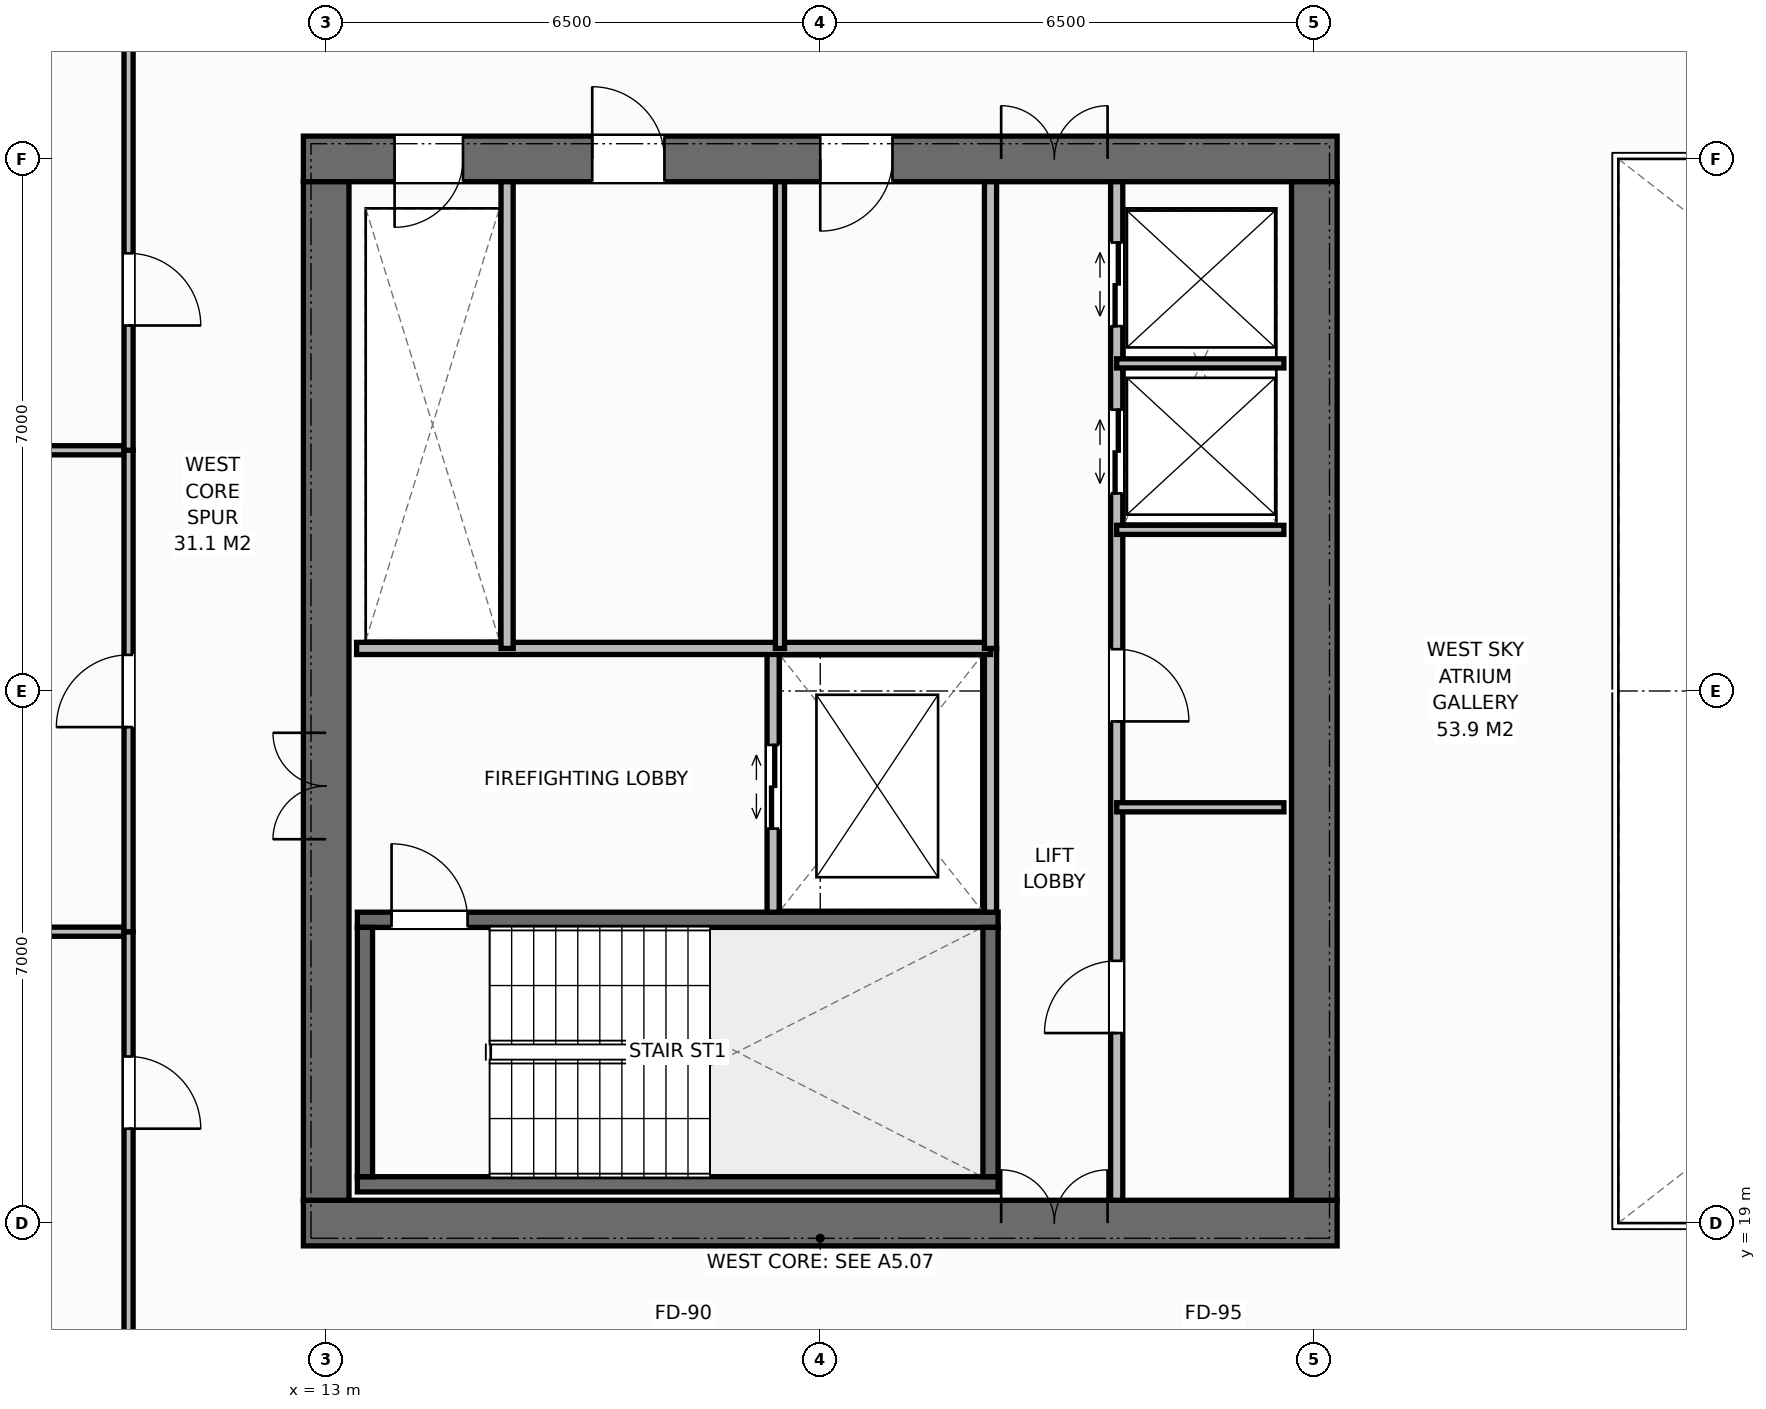
"""IFC4 building model, lengths in metres.
Left out: names, types, materials, properties, quantities, classifications, styles, units other than length and angle.
Written with IfcOpenShell. Run it as: python <this file> out.ifc"""

import sys

from ifc_helpers import new_model, si_unit, direction, frame, frame_2d, origin, place, context, subcontext, project, spatial, rectangle, extrude, element, fill, save


model = new_model("IFC4")
c1 = context("Model", 3, precision=1e-05, world=origin(), true_north=direction((0.0, 1.0)))
c2 = subcontext(c1, "Body", "Model", "MODEL_VIEW")
j1 = project(units=[si_unit("LENGTHUNIT", "METRE"), si_unit("PLANEANGLEUNIT", "RADIAN")], contexts=[c1])
p1 = place(None, origin())
s1 = spatial("IfcSite", under=j1, at=p1, CompositionType="ELEMENT")
p2 = place(p1, origin())
s2 = spatial("IfcBuilding", under=s1, at=p2, CompositionType="ELEMENT")
p3 = place(p2, frame((0.0, 0.0, 159.4)))
s3 = spatial("IfcBuildingStorey", under=s2, at=p3, CompositionType="ELEMENT", Elevation=159.4)
p4 = place(p3, frame((12.7, 19.0, 0.0), z_axis=(0.0, 0.0, 1.0), x_axis=(1.0, 0.0, 0.0)))
e1 = element("IfcWall", 1, at=p4, inside=s3, PredefinedType="SHEAR", context=c2, shape_type="SweptSolid", body=[
    extrude(rectangle(XDim=13.6, YDim=0.6, at=frame_2d((6.8, 0.0))), origin(), (0.0, 0.0, 1.0), 3.8),
])
p5 = place(p4, frame((9.18, 0.0, 0.0)))
e2 = element("IfcOpeningElement", 2, at=p5, cuts=e1, PredefinedType="OPENING", context=c2, shape_type="SweptSolid", body=[
    extrude(rectangle(XDim=1.4, YDim=2.2, at=frame_2d((0.7, 1.1))), frame((0.0, 0.31, 0.0), z_axis=(0.0, -1.0, 0.0), x_axis=(1.0, 0.0, 0.0)), (0.0, 0.0, 1.0), 0.62),
])
p6 = place(p3, frame((12.7, 33.0, 0.0), z_axis=(0.0, 0.0, 1.0), x_axis=(1.0, 0.0, 0.0)))
e3 = element("IfcWall", 3, at=p6, inside=s3, PredefinedType="SHEAR", context=c2, shape_type="SweptSolid", body=[
    extrude(rectangle(XDim=13.6, YDim=0.6, at=frame_2d((6.8, 0.0))), origin(), (0.0, 0.0, 1.0), 3.8),
])
p7 = place(p6, frame((1.2, 0.0, 0.0)))
e4 = element("IfcOpeningElement", 4, at=p7, cuts=e3, PredefinedType="OPENING", context=c2, shape_type="SweptSolid", body=[
    extrude(rectangle(XDim=0.9, YDim=2.15, at=frame_2d((0.45, 1.075))), frame((0.0, 0.31, 0.0), z_axis=(0.0, -1.0, 0.0), x_axis=(1.0, 0.0, 0.0)), (0.0, 0.0, 1.0), 0.62),
])
p8 = place(p6, frame((3.8, 0.0, 0.0)))
e5 = element("IfcOpeningElement", 5, at=p8, cuts=e3, PredefinedType="OPENING", context=c2, shape_type="SweptSolid", body=[
    extrude(rectangle(XDim=0.95, YDim=2.15, at=frame_2d((0.475, 1.075))), frame((0.0, 0.31, 0.0), z_axis=(0.0, -1.0, 0.0), x_axis=(1.0, 0.0, 0.0)), (0.0, 0.0, 1.0), 0.62),
])
p9 = place(p6, frame((6.8, 0.0, 0.0)))
e6 = element("IfcOpeningElement", 6, at=p9, cuts=e3, PredefinedType="OPENING", context=c2, shape_type="SweptSolid", body=[
    extrude(rectangle(XDim=0.95, YDim=2.15, at=frame_2d((0.475, 1.075))), frame((0.0, 0.31, 0.0), z_axis=(0.0, -1.0, 0.0), x_axis=(1.0, 0.0, 0.0)), (0.0, 0.0, 1.0), 0.62),
])
p10 = place(p6, frame((9.18, 0.0, 0.0)))
e7 = element("IfcOpeningElement", 7, at=p10, cuts=e3, PredefinedType="OPENING", context=c2, shape_type="SweptSolid", body=[
    extrude(rectangle(XDim=1.4, YDim=2.2, at=frame_2d((0.7, 1.1))), frame((0.0, 0.31, 0.0), z_axis=(0.0, -1.0, 0.0), x_axis=(1.0, 0.0, 0.0)), (0.0, 0.0, 1.0), 0.62),
])
p11 = place(p3, frame((13.0, 19.3, 0.0), z_axis=(0.0, 0.0, 1.0), x_axis=(0.0, 1.0, 0.0)))
e8 = element("IfcWall", 8, at=p11, inside=s3, PredefinedType="SHEAR", context=c2, shape_type="SweptSolid", body=[
    extrude(rectangle(XDim=13.4, YDim=0.6, at=frame_2d((6.7, 0.0))), origin(), (0.0, 0.0, 1.0), 3.8),
])
p12 = place(p11, frame((4.75, 0.0, 0.0)))
e9 = element("IfcOpeningElement", 9, at=p12, cuts=e8, PredefinedType="OPENING", context=c2, shape_type="SweptSolid", body=[
    extrude(rectangle(XDim=1.4, YDim=2.2, at=frame_2d((0.7, 1.1))), frame((0.0, 0.31, 0.0), z_axis=(0.0, -1.0, 0.0), x_axis=(1.0, 0.0, 0.0)), (0.0, 0.0, 1.0), 0.62),
])
p13 = place(p3, frame((26.0, 19.3, 0.0), z_axis=(0.0, 0.0, 1.0), x_axis=(0.0, 1.0, 0.0)))
e10 = element("IfcWall", 10, at=p13, inside=s3, PredefinedType="SHEAR", context=c2, shape_type="SweptSolid", body=[
    extrude(rectangle(XDim=13.4, YDim=0.6, at=frame_2d((6.7, 0.0))), origin(), (0.0, 0.0, 1.0), 3.8),
])
p14 = place(p3, frame((13.41, 19.51, 0.0), z_axis=(0.0, 0.0, 1.0), x_axis=(1.0, 0.0, 0.0)))
e11 = element("IfcWall", 11, at=p14, inside=s3, PredefinedType="SHEAR", context=c2, shape_type="SweptSolid", body=[
    extrude(rectangle(XDim=8.43, YDim=0.2, at=frame_2d((4.215, 0.0))), origin(), (0.0, 0.0, 1.0), 3.8),
])
p15 = place(p3, frame((13.41, 22.99, 0.0), z_axis=(0.0, 0.0, 1.0), x_axis=(1.0, 0.0, 0.0)))
e12 = element("IfcWall", 12, at=p15, inside=s3, PredefinedType="SHEAR", context=c2, shape_type="SweptSolid", body=[
    extrude(rectangle(XDim=8.43, YDim=0.2, at=frame_2d((4.215, 0.0))), origin(), (0.0, 0.0, 1.0), 3.8),
])
p16 = place(p15, frame((0.45, 0.0, 0.0)))
e13 = element("IfcOpeningElement", 13, at=p16, cuts=e12, PredefinedType="OPENING", context=c2, shape_type="SweptSolid", body=[
    extrude(rectangle(XDim=1.0, YDim=2.15, at=frame_2d((0.5, 1.075))), frame((0.0, 0.11, 0.0), z_axis=(0.0, -1.0, 0.0), x_axis=(1.0, 0.0, 0.0)), (0.0, 0.0, 1.0), 0.22),
])
for number, where, z_axis, x_axis in (
    (14, (13.51, 19.61, 0.0), (0.0, 0.0, 1.0), (0.0, 1.0, 0.0)),
    (15, (21.74, 19.61, 0.0), (0.0, 0.0, 1.0), (0.0, 1.0, 0.0)),
):
    element("IfcWall", number, at=place(p3, frame(where, z_axis=z_axis, x_axis=x_axis)), inside=s3, PredefinedType="SHEAR", context=c2, shape_type="SweptSolid", body=[
        extrude(rectangle(XDim=3.28, YDim=0.2, at=frame_2d((1.64, 0.0))), origin(), (0.0, 0.0, 1.0), 3.8),
    ])
p17 = place(p3, frame((21.74, 23.09, 0.0), z_axis=(0.0, 0.0, 1.0), x_axis=(0.0, 1.0, 0.0)))
e16 = element("IfcWall", 16, at=p17, inside=s3, PredefinedType="STANDARD", context=c2, shape_type="SweptSolid", body=[
    extrude(rectangle(XDim=3.47, YDim=0.16, at=frame_2d((1.735, 0.0))), origin(), (0.0, 0.0, 1.0), 3.572),
])
p18 = place(p3, frame((18.88, 23.09, 0.0), z_axis=(0.0, 0.0, 1.0), x_axis=(0.0, 1.0, 0.0)))
e17 = element("IfcWall", 17, at=p18, inside=s3, PredefinedType="STANDARD", context=c2, shape_type="SweptSolid", body=[
    extrude(rectangle(XDim=3.47, YDim=0.16, at=frame_2d((1.735, 0.0))), origin(), (0.0, 0.0, 1.0), 3.572),
])
p19 = place(p18, frame((1.1, 0.0, 0.0)))
e18 = element("IfcOpeningElement", 18, at=p19, cuts=e17, PredefinedType="OPENING", context=c2, shape_type="SweptSolid", body=[
    extrude(rectangle(XDim=1.1, YDim=2.2, at=frame_2d((0.55, 1.1))), frame((0.0, 0.09, 0.0), z_axis=(0.0, -1.0, 0.0), x_axis=(1.0, 0.0, 0.0)), (0.0, 0.0, 1.0), 0.18),
])
p20 = place(p3, frame((13.4, 26.56, 0.0), z_axis=(0.0, 0.0, 1.0), x_axis=(1.0, 0.0, 0.0)))
e19 = element("IfcWall", 19, at=p20, inside=s3, PredefinedType="STANDARD", context=c2, shape_type="SweptSolid", body=[
    extrude(rectangle(XDim=8.34, YDim=0.16, at=frame_2d((4.17, 0.0))), origin(), (0.0, 0.0, 1.0), 3.572),
])
p21 = place(p3, frame((15.38, 26.56, 0.0), z_axis=(0.0, 0.0, 1.0), x_axis=(0.0, 1.0, 0.0)))
e20 = element("IfcWall", 20, at=p21, inside=s3, PredefinedType="STANDARD", context=c2, shape_type="SweptSolid", body=[
    extrude(rectangle(XDim=6.14, YDim=0.16, at=frame_2d((3.07, 0.0))), origin(), (0.0, 0.0, 1.0), 3.572),
])
p22 = place(p3, frame((18.97, 26.56, 0.0), z_axis=(0.0, 0.0, 1.0), x_axis=(0.0, 1.0, 0.0)))
e21 = element("IfcWall", 21, at=p22, inside=s3, PredefinedType="PARTITIONING", context=c2, shape_type="SweptSolid", body=[
    extrude(rectangle(XDim=6.14, YDim=0.12, at=frame_2d((3.07, 0.0))), origin(), (0.0, 0.0, 1.0), 3.572),
])
p23 = place(p3, frame((21.74, 26.56, 0.0), z_axis=(0.0, 0.0, 1.0), x_axis=(0.0, 1.0, 0.0)))
e22 = element("IfcWall", 22, at=p23, inside=s3, PredefinedType="STANDARD", context=c2, shape_type="SweptSolid", body=[
    extrude(rectangle(XDim=6.14, YDim=0.16, at=frame_2d((3.07, 0.0))), origin(), (0.0, 0.0, 1.0), 3.572),
])
p24 = place(p3, frame((23.4, 19.3, 0.0), z_axis=(0.0, 0.0, 1.0), x_axis=(0.0, 1.0, 0.0)))
e23 = element("IfcWall", 23, at=p24, inside=s3, PredefinedType="STANDARD", context=c2, shape_type="SweptSolid", body=[
    extrude(rectangle(XDim=13.4, YDim=0.16, at=frame_2d((6.7, 0.0))), origin(), (0.0, 0.0, 1.0), 3.572),
])
p25 = place(p24, frame((2.2, 0.0, 0.0)))
e24 = element("IfcOpeningElement", 24, at=p25, cuts=e23, PredefinedType="OPENING", context=c2, shape_type="SweptSolid", body=[
    extrude(rectangle(XDim=0.95, YDim=2.15, at=frame_2d((0.475, 1.075))), frame((0.0, 0.09, 0.0), z_axis=(0.0, -1.0, 0.0), x_axis=(1.0, 0.0, 0.0)), (0.0, 0.0, 1.0), 0.18),
])
p26 = place(p24, frame((6.3, 0.0, 0.0)))
e25 = element("IfcOpeningElement", 25, at=p26, cuts=e23, PredefinedType="OPENING", context=c2, shape_type="SweptSolid", body=[
    extrude(rectangle(XDim=0.95, YDim=2.15, at=frame_2d((0.475, 1.075))), frame((0.0, 0.09, 0.0), z_axis=(0.0, -1.0, 0.0), x_axis=(1.0, 0.0, 0.0)), (0.0, 0.0, 1.0), 0.18),
])
p27 = place(p24, frame((9.3, 0.0, 0.0)))
e26 = element("IfcOpeningElement", 26, at=p27, cuts=e23, PredefinedType="OPENING", context=c2, shape_type="SweptSolid", body=[
    extrude(rectangle(XDim=1.1, YDim=2.2, at=frame_2d((0.55, 1.1))), frame((0.0, 0.09, 0.0), z_axis=(0.0, -1.0, 0.0), x_axis=(1.0, 0.0, 0.0)), (0.0, 0.0, 1.0), 0.18),
])
p28 = place(p24, frame((11.5, 0.0, 0.0)))
e27 = element("IfcOpeningElement", 27, at=p28, cuts=e23, PredefinedType="OPENING", context=c2, shape_type="SweptSolid", body=[
    extrude(rectangle(XDim=1.1, YDim=2.2, at=frame_2d((0.55, 1.1))), frame((0.0, 0.09, 0.0), z_axis=(0.0, -1.0, 0.0), x_axis=(1.0, 0.0, 0.0)), (0.0, 0.0, 1.0), 0.18),
])
for number, where, z_axis, x_axis in (
    (28, (23.4, 24.47, 0.0), (0.0, 0.0, 1.0), (1.0, 0.0, 0.0)),
    (29, (23.4, 28.12, 0.0), (0.0, 0.0, 1.0), (1.0, 0.0, 0.0)),
    (30, (23.4, 30.31, 0.0), (0.0, 0.0, 1.0), (1.0, 0.0, 0.0)),
):
    element("IfcWall", number, at=place(p3, frame(where, z_axis=z_axis, x_axis=x_axis)), inside=s3, PredefinedType="PARTITIONING", context=c2, shape_type="SweptSolid", body=[
        extrude(rectangle(XDim=2.2, YDim=0.12, at=frame_2d((1.1, 0.0))), origin(), (0.0, 0.0, 1.0), 3.572),
    ])
p29 = place(p3, frame((3.82, 22.833, 0.0), z_axis=(0.0, 0.0, 1.0), x_axis=(1.0, 0.0, 0.0)))
e31 = element("IfcWall", 31, at=p29, inside=s3, PredefinedType="PARTITIONING", context=c2, shape_type="SweptSolid", body=[
    extrude(rectangle(XDim=6.58, YDim=0.12, at=frame_2d((3.29, 0.0))), origin(), (0.0, 0.0, 1.0), 3.572),
])
p30 = place(p3, frame((10.4, 16.5, 0.0), z_axis=(0.0, 0.0, 1.0), x_axis=(0.0, 1.0, 0.0)))
e32 = element("IfcWall", 32, at=p30, inside=s3, PredefinedType="PARTITIONING", context=c2, shape_type="SweptSolid", body=[
    extrude(rectangle(XDim=6.333, YDim=0.12, at=frame_2d((3.167, 0.0))), origin(), (0.0, 0.0, 1.0), 3.572),
])
p31 = place(p30, frame((3.742, 0.0, 0.0)))
e33 = element("IfcOpeningElement", 33, at=p31, cuts=e32, PredefinedType="OPENING", context=c2, shape_type="SweptSolid", body=[
    extrude(rectangle(XDim=0.95, YDim=2.15, at=frame_2d((0.475, 1.075))), frame((0.0, 0.07, 0.0), z_axis=(0.0, -1.0, 0.0), x_axis=(1.0, 0.0, 0.0)), (0.0, 0.0, 1.0), 0.14),
])
p32 = place(p3, frame((3.82, 29.167, 0.0), z_axis=(0.0, 0.0, 1.0), x_axis=(1.0, 0.0, 0.0)))
e34 = element("IfcWall", 34, at=p32, inside=s3, PredefinedType="PARTITIONING", context=c2, shape_type="SweptSolid", body=[
    extrude(rectangle(XDim=6.58, YDim=0.12, at=frame_2d((3.29, 0.0))), origin(), (0.0, 0.0, 1.0), 3.572),
])
p33 = place(p3, frame((10.4, 22.833, 0.0), z_axis=(0.0, 0.0, 1.0), x_axis=(0.0, 1.0, 0.0)))
e35 = element("IfcWall", 35, at=p33, inside=s3, PredefinedType="PARTITIONING", context=c2, shape_type="SweptSolid", body=[
    extrude(rectangle(XDim=6.333, YDim=0.12, at=frame_2d((3.167, 0.0))), origin(), (0.0, 0.0, 1.0), 3.572),
])
p34 = place(p33, frame((2.692, 0.0, 0.0)))
e36 = element("IfcOpeningElement", 36, at=p34, cuts=e35, PredefinedType="OPENING", context=c2, shape_type="SweptSolid", body=[
    extrude(rectangle(XDim=0.95, YDim=2.15, at=frame_2d((0.475, 1.075))), frame((0.0, 0.07, 0.0), z_axis=(0.0, -1.0, 0.0), x_axis=(1.0, 0.0, 0.0)), (0.0, 0.0, 1.0), 0.14),
])
p35 = place(p3, frame((10.4, 29.167, 0.0), z_axis=(0.0, 0.0, 1.0), x_axis=(0.0, 1.0, 0.0)))
e37 = element("IfcWall", 37, at=p35, inside=s3, PredefinedType="PARTITIONING", context=c2, shape_type="SweptSolid", body=[
    extrude(rectangle(XDim=6.333, YDim=0.12, at=frame_2d((3.167, 0.0))), origin(), (0.0, 0.0, 1.0), 3.572),
])
p36 = place(p35, frame((1.642, 0.0, 0.0)))
e38 = element("IfcOpeningElement", 38, at=p36, cuts=e37, PredefinedType="OPENING", context=c2, shape_type="SweptSolid", body=[
    extrude(rectangle(XDim=0.95, YDim=2.15, at=frame_2d((0.475, 1.075))), frame((0.0, 0.07, 0.0), z_axis=(0.0, -1.0, 0.0), x_axis=(1.0, 0.0, 0.0)), (0.0, 0.0, 1.0), 0.14),
])
p37 = place(p16, origin())
e39 = element("IfcDoor", 39, at=p37, inside=s3, OperationType="SINGLE_SWING_LEFT", PredefinedType="DOOR", context=c2, shape_type="SweptSolid", body=[
    extrude(rectangle(XDim=1.0, YDim=2.15, at=frame_2d((0.5, 1.075))), frame((0.0, 0.025, 0.0), z_axis=(0.0, -1.0, 0.0), x_axis=(1.0, 0.0, 0.0)), (0.0, 0.0, 1.0), 0.05),
])
fill(e13, e39)
p38 = place(p12, origin())
e40 = element("IfcDoor", 40, at=p38, inside=s3, OperationType="DOUBLE_DOOR_SINGLE_SWING", PredefinedType="DOOR", context=c2, shape_type="SweptSolid", body=[
    extrude(rectangle(XDim=1.4, YDim=2.2, at=frame_2d((0.7, 1.1))), frame((0.0, 0.025, 0.0), z_axis=(0.0, -1.0, 0.0), x_axis=(1.0, 0.0, 0.0)), (0.0, 0.0, 1.0), 0.05),
])
fill(e9, e40)
p39 = place(p19, origin())
e41 = element("IfcDoor", 41, at=p39, inside=s3, OperationType="DOUBLE_DOOR_SLIDING", PredefinedType="DOOR", context=c2, shape_type="SweptSolid", body=[
    extrude(rectangle(XDim=1.1, YDim=2.2, at=frame_2d((0.55, 1.1))), frame((0.0, 0.025, 0.0), z_axis=(0.0, -1.0, 0.0), x_axis=(1.0, 0.0, 0.0)), (0.0, 0.0, 1.0), 0.05),
])
fill(e18, e41)
p40 = place(p7, origin())
e42 = element("IfcDoor", 42, at=p40, inside=s3, OperationType="SINGLE_SWING_RIGHT", PredefinedType="DOOR", context=c2, shape_type="SweptSolid", body=[
    extrude(rectangle(XDim=0.9, YDim=2.15, at=frame_2d((0.45, 1.075))), frame((0.0, -0.025, 0.0), z_axis=(0.0, -1.0, 0.0), x_axis=(1.0, 0.0, 0.0)), (0.0, 0.0, 1.0), 0.05),
])
fill(e4, e42)
p41 = place(p8, origin())
e43 = element("IfcDoor", 43, at=p41, inside=s3, OperationType="SINGLE_SWING_LEFT", PredefinedType="DOOR", context=c2, shape_type="SweptSolid", body=[
    extrude(rectangle(XDim=0.95, YDim=2.15, at=frame_2d((0.475, 1.075))), frame((0.0, -0.025, 0.0), z_axis=(0.0, -1.0, 0.0), x_axis=(1.0, 0.0, 0.0)), (0.0, 0.0, 1.0), 0.05),
])
fill(e5, e43)
p42 = place(p9, origin())
e44 = element("IfcDoor", 44, at=p42, inside=s3, OperationType="SINGLE_SWING_RIGHT", PredefinedType="DOOR", context=c2, shape_type="SweptSolid", body=[
    extrude(rectangle(XDim=0.95, YDim=2.15, at=frame_2d((0.475, 1.075))), frame((0.0, -0.025, 0.0), z_axis=(0.0, -1.0, 0.0), x_axis=(1.0, 0.0, 0.0)), (0.0, 0.0, 1.0), 0.05),
])
fill(e6, e44)
p43 = place(p5, origin())
e45 = element("IfcDoor", 45, at=p43, inside=s3, OperationType="DOUBLE_DOOR_SINGLE_SWING", PredefinedType="DOOR", context=c2, shape_type="SweptSolid", body=[
    extrude(rectangle(XDim=1.4, YDim=2.2, at=frame_2d((0.7, 1.1))), frame((0.0, 0.075, 0.0), z_axis=(0.0, -1.0, 0.0), x_axis=(1.0, 0.0, 0.0)), (0.0, 0.0, 1.0), 0.05),
])
fill(e2, e45)
p44 = place(p10, origin())
e46 = element("IfcDoor", 46, at=p44, inside=s3, OperationType="DOUBLE_DOOR_SINGLE_SWING", PredefinedType="DOOR", context=c2, shape_type="SweptSolid", body=[
    extrude(rectangle(XDim=1.4, YDim=2.2, at=frame_2d((0.7, 1.1))), frame((0.0, -0.025, 0.0), z_axis=(0.0, -1.0, 0.0), x_axis=(1.0, 0.0, 0.0)), (0.0, 0.0, 1.0), 0.05),
])
fill(e7, e46)
p45 = place(p25, origin())
e47 = element("IfcDoor", 47, at=p45, inside=s3, OperationType="SINGLE_SWING_LEFT", PredefinedType="DOOR", context=c2, shape_type="SweptSolid", body=[
    extrude(rectangle(XDim=0.95, YDim=2.15, at=frame_2d((0.475, 1.075))), frame((0.0, 0.025, 0.0), z_axis=(0.0, -1.0, 0.0), x_axis=(1.0, 0.0, 0.0)), (0.0, 0.0, 1.0), 0.05),
])
fill(e24, e47)
p46 = place(p26, origin())
e48 = element("IfcDoor", 48, at=p46, inside=s3, OperationType="SINGLE_SWING_RIGHT", PredefinedType="DOOR", context=c2, shape_type="SweptSolid", body=[
    extrude(rectangle(XDim=0.95, YDim=2.15, at=frame_2d((0.475, 1.075))), frame((0.0, 0.025, 0.0), z_axis=(0.0, -1.0, 0.0), x_axis=(1.0, 0.0, 0.0)), (0.0, 0.0, 1.0), 0.05),
])
fill(e25, e48)
p47 = place(p27, origin())
e49 = element("IfcDoor", 49, at=p47, inside=s3, OperationType="DOUBLE_DOOR_SLIDING", PredefinedType="DOOR", context=c2, shape_type="SweptSolid", body=[
    extrude(rectangle(XDim=1.1, YDim=2.2, at=frame_2d((0.55, 1.1))), frame((0.0, 0.025, 0.0), z_axis=(0.0, -1.0, 0.0), x_axis=(1.0, 0.0, 0.0)), (0.0, 0.0, 1.0), 0.05),
])
fill(e26, e49)
p48 = place(p28, origin())
e50 = element("IfcDoor", 50, at=p48, inside=s3, OperationType="DOUBLE_DOOR_SLIDING", PredefinedType="DOOR", context=c2, shape_type="SweptSolid", body=[
    extrude(rectangle(XDim=1.1, YDim=2.2, at=frame_2d((0.55, 1.1))), frame((0.0, 0.025, 0.0), z_axis=(0.0, -1.0, 0.0), x_axis=(1.0, 0.0, 0.0)), (0.0, 0.0, 1.0), 0.05),
])
fill(e27, e50)
p49 = place(p31, origin())
e51 = element("IfcDoor", 51, at=p49, inside=s3, OperationType="SINGLE_SWING_RIGHT", PredefinedType="DOOR", context=c2, shape_type="SweptSolid", body=[
    extrude(rectangle(XDim=0.95, YDim=2.15, at=frame_2d((0.475, 1.075))), frame((0.0, 0.025, 0.0), z_axis=(0.0, -1.0, 0.0), x_axis=(1.0, 0.0, 0.0)), (0.0, 0.0, 1.0), 0.05),
])
fill(e33, e51)
p50 = place(p34, origin())
e52 = element("IfcDoor", 52, at=p50, inside=s3, OperationType="SINGLE_SWING_LEFT", PredefinedType="DOOR", context=c2, shape_type="SweptSolid", body=[
    extrude(rectangle(XDim=0.95, YDim=2.15, at=frame_2d((0.475, 1.075))), frame((0.0, 0.025, 0.0), z_axis=(0.0, -1.0, 0.0), x_axis=(1.0, 0.0, 0.0)), (0.0, 0.0, 1.0), 0.05),
])
fill(e36, e52)
p51 = place(p36, origin())
e53 = element("IfcDoor", 53, at=p51, inside=s3, OperationType="SINGLE_SWING_RIGHT", PredefinedType="DOOR", context=c2, shape_type="SweptSolid", body=[
    extrude(rectangle(XDim=0.95, YDim=2.15, at=frame_2d((0.475, 1.075))), frame((0.0, 0.025, 0.0), z_axis=(0.0, -1.0, 0.0), x_axis=(1.0, 0.0, 0.0)), (0.0, 0.0, 1.0), 0.05),
])
fill(e38, e53)
save(model, sys.argv[1])
